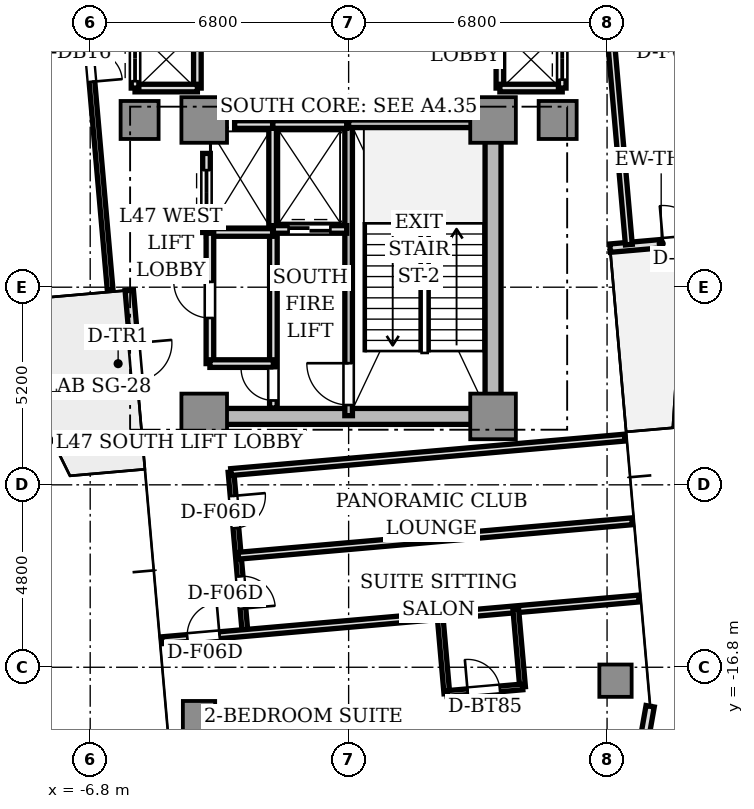
"""IFC4 building model, lengths in metres.
Left out: names, types, materials, properties, quantities, classifications, styles, units other than length and angle.
Written with IfcOpenShell. Run it as: python <this file> out.ifc"""

import sys

from ifc_helpers import new_model, si_unit, direction, frame, frame_2d, origin, origin_2d, place, context, subcontext, project, spatial, rectangle, extrude, source, transform, mapped, element, fill, save


model = new_model("IFC4")
c1 = context("Model", 3, precision=1e-05, world=origin(), true_north=direction((0.0, 1.0)))
c2 = subcontext(c1, "Body", "Model", "MODEL_VIEW")
j1 = project(units=[si_unit("LENGTHUNIT", "METRE"), si_unit("PLANEANGLEUNIT", "RADIAN")], contexts=[c1])
p1 = place(None, origin())
s1 = spatial("IfcSite", under=j1, at=p1, CompositionType="ELEMENT")
p2 = place(p1, origin())
s2 = spatial("IfcBuilding", under=s1, at=p2, CompositionType="ELEMENT")
p3 = place(p2, frame((0.0, 0.0, 170.7)))
s3 = spatial("IfcBuildingStorey", under=s2, at=p3, CompositionType="ELEMENT", Elevation=170.7)
p4 = place(p3, frame((-3.55, -10.2, 0.0), z_axis=(0.0, 0.0, 1.0), x_axis=(1.0, 0.0, 0.0)))
e1 = element("IfcWall", 1, at=p4, inside=s3, PredefinedType="SHEAR", context=c2, shape_type="SweptSolid", body=[
    extrude(rectangle(XDim=7.1, YDim=0.42, at=frame_2d((3.55, 0.0))), origin(), (0.0, 0.0, 1.0), 4.26),
])
p5 = place(p3, frame((3.8, -9.75, 0.0), z_axis=(0.0, 0.0, 1.0), x_axis=(0.0, 1.0, 0.0)))
e2 = element("IfcWall", 2, at=p5, inside=s3, PredefinedType="SHEAR", context=c2, shape_type="SweptSolid", body=[
    extrude(rectangle(XDim=6.9, YDim=0.42, at=frame_2d((3.45, 0.0))), origin(), (0.0, 0.0, 1.0), 4.26),
])
m1 = source(origin(), c2, "Body", "SweptSolid", [
    extrude(rectangle(XDim=1.2, YDim=1.2, at=origin_2d()), origin(), (0.0, 0.0, 1.0), 4.26),
])
for number, where, z_axis, x_axis in (
    (3, (-3.8, -2.4, 0.0), (0.0, 0.0, 1.0), (1.0, 0.0, 0.0)),
    (4, (3.8, -2.4, 0.0), (0.0, 0.0, 1.0), (1.0, 0.0, 0.0)),
    (5, (-3.8, -10.2, 0.0), (0.0, 0.0, 1.0), (1.0, 0.0, 0.0)),
    (6, (3.8, -10.2, 0.0), (0.0, 0.0, 1.0), (1.0, 0.0, 0.0)),
):
    element("IfcColumn", number, at=place(p3, frame(where, z_axis=z_axis, x_axis=x_axis)), inside=s3, PredefinedType="COLUMN", context=c2, shape_type="MappedRepresentation", body=[
        mapped(m1, transform((0.0, 0.0, 0.0), scale=1.0)),
    ])
m2 = source(origin(), c2, "Body", "SweptSolid", [
    extrude(rectangle(XDim=1.0, YDim=1.0, at=origin_2d()), origin(), (0.0, 0.0, 1.0), 4.26),
])
for number, where, z_axis, x_axis in (
    (7, (5.5, -2.4, 0.0), (0.0, 0.0, 1.0), (1.0, 0.0, 0.0)),
    (8, (-5.5, -2.4, 0.0), (0.0, 0.0, 1.0), (1.0, 0.0, 0.0)),
):
    element("IfcColumn", number, at=place(p3, frame(where, z_axis=z_axis, x_axis=x_axis)), inside=s3, PredefinedType="COLUMN", context=c2, shape_type="MappedRepresentation", body=[
        mapped(m2, transform((0.0, 0.0, 0.0), scale=1.0)),
    ])
m3 = source(origin(), c2, "Body", "SweptSolid", [
    extrude(rectangle(XDim=0.85, YDim=0.85, at=origin_2d()), origin(), (0.0, 0.0, 1.0), 4.26),
])
for number, where, z_axis, x_axis in (
    (9, (-3.936, -18.112, 0.0), (0.0, 0.0, 1.0), (1.0, 0.0, 0.0)),
    (10, (7.022, -17.153, 0.0), (0.0, 0.0, 1.0), (1.0, 0.0, 0.0)),
):
    element("IfcColumn", number, at=place(p3, frame(where, z_axis=z_axis, x_axis=x_axis)), inside=s3, PredefinedType="COLUMN", context=c2, shape_type="MappedRepresentation", body=[
        mapped(m3, transform((0.0, 0.0, 0.0), scale=1.0)),
    ])
p6 = place(p3, frame((6.879, -5.772, 0.0), z_axis=(0.0, 0.0, 1.0), x_axis=(0.996193619346, 0.087168071984, 0.0)))
e11 = element("IfcWall", 11, at=p6, inside=s3, PredefinedType="STANDARD", context=c2, shape_type="SweptSolid", body=[
    extrude(rectangle(XDim=2.7, YDim=0.22, at=frame_2d((1.35, 0.0))), origin(), (0.0, 0.0, 1.0), 4.26),
])
p7 = place(p6, frame((1.4, 0.0, 0.0)))
e12 = element("IfcOpeningElement", 12, at=p7, cuts=e11, PredefinedType="OPENING", context=c2, shape_type="SweptSolid", body=[
    extrude(rectangle(XDim=1.0, YDim=2.2, at=frame_2d((0.5, 1.1))), frame((0.0, 0.12, 0.0), z_axis=(0.0, -1.0, 0.0), x_axis=(1.0, 0.0, 0.0)), (0.0, 0.0, 1.0), 0.24),
])
p8 = place(p3, frame((-5.772, -6.879, 0.0), z_axis=(0.0, 0.0, 1.0), x_axis=(0.087168071984, -0.996193619346, 0.0)))
e13 = element("IfcWall", 13, at=p8, inside=s3, PredefinedType="STANDARD", context=c2, shape_type="SweptSolid", body=[
    extrude(rectangle(XDim=2.7, YDim=0.22, at=frame_2d((1.35, 0.0))), origin(), (0.0, 0.0, 1.0), 4.26),
])
p9 = place(p8, frame((1.4, 0.0, 0.0)))
e14 = element("IfcOpeningElement", 14, at=p9, cuts=e13, PredefinedType="OPENING", context=c2, shape_type="SweptSolid", body=[
    extrude(rectangle(XDim=1.0, YDim=2.2, at=frame_2d((0.5, 1.1))), frame((0.0, 0.12, 0.0), z_axis=(0.0, -1.0, 0.0), x_axis=(1.0, 0.0, 0.0)), (0.0, 0.0, 1.0), 0.24),
])
p10 = place(p3, frame((7.768, -18.769, 0.0), z_axis=(0.0, 0.0, 1.0), x_axis=(0.173654409999, 0.984806654064, 0.0)))
e15 = element("IfcWall", 15, at=p10, inside=s3, PredefinedType="STANDARD", context=c2, shape_type="SweptSolid", body=[
    extrude(rectangle(XDim=0.958, YDim=0.22, at=frame_2d((0.479, 0.0))), origin(), (0.0, 0.0, 1.0), 4.26),
])
p11 = place(p3, frame((0.0, -10.18, 0.0), z_axis=(0.0, 0.0, 1.0), x_axis=(0.0, 1.0, 0.0)))
e16 = element("IfcWall", 16, at=p11, inside=s3, PredefinedType="SOLIDWALL", context=c2, shape_type="SweptSolid", body=[
    extrude(rectangle(XDim=7.68, YDim=0.2, at=frame_2d((3.84, 0.0))), origin(), (0.0, 0.0, 1.0), 4.26),
])
p12 = place(p11, frame((0.28, 0.0, 0.0)))
e17 = element("IfcOpeningElement", 17, at=p12, cuts=e16, PredefinedType="OPENING", context=c2, shape_type="SweptSolid", body=[
    extrude(rectangle(XDim=1.1, YDim=2.15, at=frame_2d((0.55, 1.075))), frame((0.0, 0.11, 0.0), z_axis=(0.0, -1.0, 0.0), x_axis=(1.0, 0.0, 0.0)), (0.0, 0.0, 1.0), 0.22),
])
p13 = place(p3, frame((0.0, -2.5, 0.0), z_axis=(0.0, 0.0, 1.0), x_axis=(1.0, 0.0, 0.0)))
e18 = element("IfcWall", 18, at=p13, inside=s3, PredefinedType="SOLIDWALL", context=c2, shape_type="SweptSolid", body=[
    extrude(rectangle(XDim=3.72, YDim=0.2, at=frame_2d((1.86, 0.0))), origin(), (0.0, 0.0, 1.0), 4.26),
])
p14 = place(p3, frame((-1.98, -9.98, 0.0), z_axis=(0.0, 0.0, 1.0), x_axis=(0.0, 1.0, 0.0)))
e19 = element("IfcWall", 19, at=p14, inside=s3, PredefinedType="SOLIDWALL", context=c2, shape_type="SweptSolid", body=[
    extrude(rectangle(XDim=4.66, YDim=0.2, at=frame_2d((2.33, 0.0))), origin(), (0.0, 0.0, 1.0), 3.81),
])
p15 = place(p14, frame((0.2, 0.0, 0.0)))
e20 = element("IfcOpeningElement", 20, at=p15, cuts=e19, PredefinedType="OPENING", context=c2, shape_type="SweptSolid", body=[
    extrude(rectangle(XDim=0.85, YDim=2.1, at=frame_2d((0.425, 1.05))), frame((0.0, 0.11, 0.0), z_axis=(0.0, -1.0, 0.0), x_axis=(1.0, 0.0, 0.0)), (0.0, 0.0, 1.0), 0.22),
])
p16 = place(p3, frame((-2.0, -5.28, 0.0), z_axis=(0.0, 0.0, 1.0), x_axis=(0.0, 1.0, 0.0)))
e21 = element("IfcWall", 21, at=p16, inside=s3, PredefinedType="SOLIDWALL", context=c2, shape_type="SweptSolid", body=[
    extrude(rectangle(XDim=2.78, YDim=0.2, at=frame_2d((1.39, 0.0))), origin(), (0.0, 0.0, 1.0), 3.81),
])
p17 = place(p3, frame((-2.0, -2.52, 0.0), z_axis=(0.0, 0.0, 1.0), x_axis=(1.0, 0.0, 0.0)))
e22 = element("IfcWall", 22, at=p17, inside=s3, PredefinedType="SOLIDWALL", context=c2, shape_type="SweptSolid", body=[
    extrude(rectangle(XDim=1.95, YDim=0.2, at=frame_2d((0.975, 0.0))), origin(), (0.0, 0.0, 1.0), 3.81),
])
p18 = place(p3, frame((-1.98, -5.28, 0.0), z_axis=(0.0, 0.0, 1.0), x_axis=(1.0, 0.0, 0.0)))
e23 = element("IfcWall", 23, at=p18, inside=s3, PredefinedType="SOLIDWALL", context=c2, shape_type="SweptSolid", body=[
    extrude(rectangle(XDim=1.93, YDim=0.2, at=frame_2d((0.965, 0.0))), origin(), (0.0, 0.0, 1.0), 3.81),
])
p19 = place(p18, frame((0.4, 0.0, 0.0)))
e24 = element("IfcOpeningElement", 24, at=p19, cuts=e23, PredefinedType="OPENING", context=c2, shape_type="SweptSolid", body=[
    extrude(rectangle(XDim=1.1, YDim=2.2, at=frame_2d((0.55, 1.1))), frame((0.0, 0.11, 0.0), z_axis=(0.0, -1.0, 0.0), x_axis=(1.0, 0.0, 0.0)), (0.0, 0.0, 1.0), 0.22),
])
p20 = place(p3, frame((-3.0, -2.52, 0.0), z_axis=(0.0, 0.0, 1.0), x_axis=(1.0, 0.0, 0.0)))
e25 = element("IfcWall", 25, at=p20, inside=s3, PredefinedType="SOLIDWALL", context=c2, shape_type="SweptSolid", body=[
    extrude(rectangle(XDim=1.0, YDim=0.2, at=frame_2d((0.5, 0.0))), origin(), (0.0, 0.0, 1.0), 3.81),
])
p21 = place(p3, frame((-3.74, -5.36, 0.0), z_axis=(0.0, 0.0, 1.0), x_axis=(1.0, 0.0, 0.0)))
e26 = element("IfcWall", 26, at=p21, inside=s3, PredefinedType="SOLIDWALL", context=c2, shape_type="SweptSolid", body=[
    extrude(rectangle(XDim=1.74, YDim=0.2, at=frame_2d((0.87, 0.0))), origin(), (0.0, 0.0, 1.0), 3.81),
])
p22 = place(p3, frame((-3.74, -5.36, 0.0), z_axis=(0.0, 0.0, 1.0), x_axis=(0.0, 1.0, 0.0)))
e27 = element("IfcWall", 27, at=p22, inside=s3, PredefinedType="SOLIDWALL", context=c2, shape_type="SweptSolid", body=[
    extrude(rectangle(XDim=2.08, YDim=0.2, at=frame_2d((1.04, 0.0))), origin(), (0.0, 0.0, 1.0), 3.81),
])
p23 = place(p22, frame((0.44, 0.0, 0.0)))
e28 = element("IfcOpeningElement", 28, at=p23, cuts=e27, PredefinedType="OPENING", context=c2, shape_type="SweptSolid", body=[
    extrude(rectangle(XDim=1.2, YDim=2.2, at=frame_2d((0.6, 1.1))), frame((0.0, 0.11, 0.0), z_axis=(0.0, -1.0, 0.0), x_axis=(1.0, 0.0, 0.0)), (0.0, 0.0, 1.0), 0.22),
])
p24 = place(p3, frame((3.98, -1.56, 0.0), z_axis=(0.0, 0.0, 1.0), x_axis=(0.0, 1.0, 0.0)))
e29 = element("IfcWall", 29, at=p24, inside=s3, PredefinedType="SOLIDWALL", context=c2, shape_type="SweptSolid", body=[
    extrude(rectangle(XDim=3.12, YDim=0.2, at=frame_2d((1.56, 0.0))), origin(), (0.0, 0.0, 1.0), 3.43),
])
p25 = place(p3, frame((3.98, -1.56, 0.0), z_axis=(0.0, 0.0, 1.0), x_axis=(1.0, 0.0, 0.0)))
e30 = element("IfcWall", 30, at=p25, inside=s3, PredefinedType="SOLIDWALL", context=c2, shape_type="SweptSolid", body=[
    extrude(rectangle(XDim=1.64, YDim=0.2, at=frame_2d((0.82, 0.0))), origin(), (0.0, 0.0, 1.0), 3.81),
])
p26 = place(p3, frame((5.62, -1.56, 0.0), z_axis=(0.0, 0.0, 1.0), x_axis=(0.0, 1.0, 0.0)))
e31 = element("IfcWall", 31, at=p26, inside=s3, PredefinedType="SOLIDWALL", context=c2, shape_type="SweptSolid", body=[
    extrude(rectangle(XDim=1.56, YDim=0.2, at=frame_2d((0.78, 0.0))), origin(), (0.0, 0.0, 1.0), 3.81),
])
p27 = place(p26, frame((0.22, 0.0, 0.0)))
e32 = element("IfcOpeningElement", 32, at=p27, cuts=e31, PredefinedType="OPENING", context=c2, shape_type="SweptSolid", body=[
    extrude(rectangle(XDim=1.1, YDim=2.2, at=frame_2d((0.55, 1.1))), frame((0.0, 0.11, 0.0), z_axis=(0.0, -1.0, 0.0), x_axis=(1.0, 0.0, 0.0)), (0.0, 0.0, 1.0), 0.22),
])
p28 = place(p3, frame((-3.98, -1.56, 0.0), z_axis=(0.0, 0.0, 1.0), x_axis=(0.0, 1.0, 0.0)))
e33 = element("IfcWall", 33, at=p28, inside=s3, PredefinedType="SOLIDWALL", context=c2, shape_type="SweptSolid", body=[
    extrude(rectangle(XDim=3.12, YDim=0.2, at=frame_2d((1.56, 0.0))), origin(), (0.0, 0.0, 1.0), 3.43),
])
p29 = place(p3, frame((-5.62, -1.56, 0.0), z_axis=(0.0, 0.0, 1.0), x_axis=(1.0, 0.0, 0.0)))
e34 = element("IfcWall", 34, at=p29, inside=s3, PredefinedType="SOLIDWALL", context=c2, shape_type="SweptSolid", body=[
    extrude(rectangle(XDim=1.64, YDim=0.2, at=frame_2d((0.82, 0.0))), origin(), (0.0, 0.0, 1.0), 3.81),
])
p30 = place(p3, frame((-5.62, -1.56, 0.0), z_axis=(0.0, 0.0, 1.0), x_axis=(0.0, 1.0, 0.0)))
e35 = element("IfcWall", 35, at=p30, inside=s3, PredefinedType="SOLIDWALL", context=c2, shape_type="SweptSolid", body=[
    extrude(rectangle(XDim=1.56, YDim=0.2, at=frame_2d((0.78, 0.0))), origin(), (0.0, 0.0, 1.0), 3.81),
])
p31 = place(p30, frame((0.18, 0.0, 0.0)))
e36 = element("IfcOpeningElement", 36, at=p31, cuts=e35, PredefinedType="OPENING", context=c2, shape_type="SweptSolid", body=[
    extrude(rectangle(XDim=1.2, YDim=2.2, at=frame_2d((0.6, 1.1))), frame((0.0, 0.11, 0.0), z_axis=(0.0, -1.0, 0.0), x_axis=(1.0, 0.0, 0.0)), (0.0, 0.0, 1.0), 0.22),
])
p32 = place(p3, frame((-3.65, -8.81, 0.0), z_axis=(0.0, 0.0, 1.0), x_axis=(0.0, 1.0, 0.0)))
e37 = element("IfcWall", 37, at=p32, inside=s3, PredefinedType="SOLIDWALL", context=c2, shape_type="SweptSolid", body=[
    extrude(rectangle(XDim=3.43, YDim=0.2, at=frame_2d((1.715, 0.0))), origin(), (0.0, 0.0, 1.0), 3.81),
])
p33 = place(p32, frame((1.2, 0.0, 0.0)))
e38 = element("IfcOpeningElement", 38, at=p33, cuts=e37, PredefinedType="OPENING", context=c2, shape_type="SweptSolid", body=[
    extrude(rectangle(XDim=0.95, YDim=2.15, at=frame_2d((0.475, 1.075))), frame((0.0, 0.11, 0.0), z_axis=(0.0, -1.0, 0.0), x_axis=(1.0, 0.0, 0.0)), (0.0, 0.0, 1.0), 0.22),
])
p34 = place(p3, frame((-3.65, -8.81, 0.0), z_axis=(0.0, 0.0, 1.0), x_axis=(1.0, 0.0, 0.0)))
e39 = element("IfcWall", 39, at=p34, inside=s3, PredefinedType="SOLIDWALL", context=c2, shape_type="SweptSolid", body=[
    extrude(rectangle(XDim=1.67, YDim=0.2, at=frame_2d((0.835, 0.0))), origin(), (0.0, 0.0, 1.0), 3.81),
])
p35 = place(p3, frame((7.373, -5.679, 0.0), z_axis=(0.0, 0.0, 1.0), x_axis=(-0.087161289348, 0.996194212812, 0.0)))
e40 = element("IfcWall", 40, at=p35, inside=s3, PredefinedType="PARTITIONING", context=c2, shape_type="SweptSolid", body=[
    extrude(rectangle(XDim=5.35, YDim=0.18, at=frame_2d((2.675, 0.0))), origin(), (0.0, 0.0, 1.0), 3.81),
])
p36 = place(p3, frame((-7.373, 5.679, 0.0), z_axis=(0.0, 0.0, 1.0), x_axis=(0.087154691724, -0.996194790044, 0.0)))
e41 = element("IfcWall", 41, at=p36, inside=s3, PredefinedType="PARTITIONING", context=c2, shape_type="SweptSolid", body=[
    extrude(rectangle(XDim=12.6, YDim=0.15, at=frame_2d((6.3, 0.0))), origin(), (0.0, 0.0, 1.0), 3.81),
])
p37 = place(p36, frame((5.5, 0.0, 0.0)))
e42 = element("IfcOpeningElement", 42, at=p37, cuts=e41, PredefinedType="OPENING", context=c2, shape_type="SweptSolid", body=[
    extrude(rectangle(XDim=1.6, YDim=2.25, at=frame_2d((0.8, 1.125))), frame((0.0, 0.085, 0.0), z_axis=(0.0, -1.0, 0.0), x_axis=(1.0, 0.0, 0.0)), (0.0, 0.0, 1.0), 0.17),
])
p38 = place(p3, frame((-3.095, -11.664, 0.0), z_axis=(0.0, 0.0, 1.0), x_axis=(0.087142722004, -0.996195837173, 0.0)))
e43 = element("IfcWall", 43, at=p38, inside=s3, PredefinedType="PARTITIONING", context=c2, shape_type="SweptSolid", body=[
    extrude(rectangle(XDim=4.25, YDim=0.15, at=frame_2d((2.125, 0.0))), origin(), (0.0, 0.0, 1.0), 3.81),
])
p39 = place(p38, frame((0.63, 0.0, 0.0)))
e44 = element("IfcOpeningElement", 44, at=p39, cuts=e43, PredefinedType="OPENING", context=c2, shape_type="SweptSolid", body=[
    extrude(rectangle(XDim=0.85, YDim=2.1, at=frame_2d((0.425, 1.05))), frame((0.0, 0.085, 0.0), z_axis=(0.0, -1.0, 0.0), x_axis=(1.0, 0.0, 0.0)), (0.0, 0.0, 1.0), 0.17),
])
p40 = place(p38, frame((2.755, 0.0, 0.0)))
e45 = element("IfcOpeningElement", 45, at=p40, cuts=e43, PredefinedType="OPENING", context=c2, shape_type="SweptSolid", body=[
    extrude(rectangle(XDim=0.85, YDim=2.1, at=frame_2d((0.425, 1.05))), frame((0.0, 0.085, 0.0), z_axis=(0.0, -1.0, 0.0), x_axis=(1.0, 0.0, 0.0)), (0.0, 0.0, 1.0), 0.17),
])
p41 = place(p3, frame((-3.095, -11.664, 0.0), z_axis=(0.0, 0.0, 1.0), x_axis=(0.996196061386, 0.087140158824, 0.0)))
e46 = element("IfcWall", 46, at=p41, inside=s3, PredefinedType="PARTITIONING", context=c2, shape_type="SweptSolid", body=[
    extrude(rectangle(XDim=10.4, YDim=0.18, at=frame_2d((5.2, 0.0))), origin(), (0.0, 0.0, 1.0), 3.81),
])
p42 = place(p3, frame((-2.903, -13.866, 0.0), z_axis=(0.0, 0.0, 1.0), x_axis=(0.996194201607, 0.087161417409, 0.0)))
e47 = element("IfcWall", 47, at=p42, inside=s3, PredefinedType="PARTITIONING", context=c2, shape_type="SweptSolid", body=[
    extrude(rectangle(XDim=10.4, YDim=0.18, at=frame_2d((5.2, 0.0))), origin(), (0.0, 0.0, 1.0), 3.81),
])
p43 = place(p3, frame((-4.917, -16.09, 0.0), z_axis=(0.0, 0.0, 1.0), x_axis=(0.996196619285, 0.087133780622, 0.0)))
e48 = element("IfcWall", 48, at=p43, inside=s3, PredefinedType="PARTITIONING", context=c2, shape_type="SweptSolid", body=[
    extrude(rectangle(XDim=12.6, YDim=0.18, at=frame_2d((6.3, 0.0))), origin(), (0.0, 0.0, 1.0), 3.81),
])
p44 = place(p43, frame((0.675, 0.0, 0.0)))
e49 = element("IfcOpeningElement", 49, at=p44, cuts=e48, PredefinedType="OPENING", context=c2, shape_type="SweptSolid", body=[
    extrude(rectangle(XDim=0.85, YDim=2.1, at=frame_2d((0.425, 1.05))), frame((0.0, 0.1, 0.0), z_axis=(0.0, -1.0, 0.0), x_axis=(1.0, 0.0, 0.0)), (0.0, 0.0, 1.0), 0.2),
])
for number, where, z_axis, x_axis in (
    (50, (4.398, -15.275, 0.0), (0.0, 0.0, 1.0), (0.087, -0.996, 0.0)),
    (51, (2.406, -15.449, 0.0), (0.0, 0.0, 1.0), (0.087, -0.996, 0.0)),
):
    element("IfcWall", number, at=place(p3, frame(where, z_axis=z_axis, x_axis=x_axis)), inside=s3, PredefinedType="PARTITIONING", context=c2, shape_type="SweptSolid", body=[
        extrude(rectangle(XDim=2.05, YDim=0.15, at=frame_2d((1.025, 0.0))), origin(), (0.0, 0.0, 1.0), 3.81),
    ])
p45 = place(p3, frame((2.584, -17.491, 0.0), z_axis=(0.0, 0.0, 1.0), x_axis=(0.99619464492, 0.087156350505, 0.0)))
e52 = element("IfcWall", 52, at=p45, inside=s3, PredefinedType="PARTITIONING", context=c2, shape_type="SweptSolid", body=[
    extrude(rectangle(XDim=2.0, YDim=0.15, at=frame_2d((1.0, 0.0))), origin(), (0.0, 0.0, 1.0), 3.78),
])
p46 = place(p45, frame((0.55, 0.0, 0.0)))
e53 = element("IfcOpeningElement", 53, at=p46, cuts=e52, PredefinedType="OPENING", context=c2, shape_type="SweptSolid", body=[
    extrude(rectangle(XDim=0.85, YDim=2.1, at=frame_2d((0.425, 1.05))), frame((0.0, 0.085, 0.0), z_axis=(0.0, -1.0, 0.0), x_axis=(1.0, 0.0, 0.0)), (0.0, 0.0, 1.0), 0.17),
])
m4 = source(origin(), c2, "Body", "SweptSolid", [
    extrude(rectangle(XDim=1.0, YDim=0.05, at=origin_2d()), origin(), (0.0, 0.0, 1.0), 2.2),
])
p47 = place(p7, frame((0.5, 0.0, 0.0)))
e54 = element("IfcDoor", 54, at=p47, inside=s3, OperationType="SINGLE_SWING_LEFT", PredefinedType="DOOR", context=c2, shape_type="MappedRepresentation", body=[
    mapped(m4, transform((0.0, 0.0, 0.0), scale=1.0)),
])
fill(e12, e54)
p48 = place(p9, frame((0.5, 0.0, 0.0)))
e55 = element("IfcDoor", 55, at=p48, inside=s3, OperationType="SINGLE_SWING_LEFT", PredefinedType="DOOR", context=c2, shape_type="MappedRepresentation", body=[
    mapped(m4, transform((0.0, 0.0, 0.0), scale=1.0)),
])
fill(e14, e55)
m5 = source(origin(), c2, "Body", "SweptSolid", [
    extrude(rectangle(XDim=1.1, YDim=0.05, at=origin_2d()), origin(), (0.0, 0.0, 1.0), 2.15),
])
p49 = place(p12, frame((0.55, 0.0, 0.0)))
e56 = element("IfcDoor", 56, at=p49, inside=s3, OperationType="SINGLE_SWING_RIGHT", PredefinedType="DOOR", context=c2, shape_type="MappedRepresentation", body=[
    mapped(m5, transform((0.0, 0.0, 0.0), scale=1.0)),
])
fill(e17, e56)
m6 = source(origin(), c2, "Body", "SweptSolid", [
    extrude(rectangle(XDim=0.85, YDim=0.05, at=origin_2d()), origin(), (0.0, 0.0, 1.0), 2.1),
])
p50 = place(p15, frame((0.425, 0.0, 0.0)))
e57 = element("IfcDoor", 57, at=p50, inside=s3, OperationType="SINGLE_SWING_RIGHT", PredefinedType="DOOR", context=c2, shape_type="MappedRepresentation", body=[
    mapped(m6, transform((0.0, 0.0, 0.0), scale=1.0)),
])
fill(e20, e57)
m7 = source(origin(), c2, "Body", "SweptSolid", [
    extrude(rectangle(XDim=1.1, YDim=0.05, at=origin_2d()), origin(), (0.0, 0.0, 1.0), 2.2),
])
p51 = place(p19, frame((0.55, 0.0, 0.0)))
e58 = element("IfcDoor", 58, at=p51, inside=s3, OperationType="DOUBLE_DOOR_SLIDING", PredefinedType="DOOR", context=c2, shape_type="MappedRepresentation", body=[
    mapped(m7, transform((0.0, 0.0, 0.0), scale=1.0)),
])
fill(e24, e58)
m8 = source(origin(), c2, "Body", "SweptSolid", [
    extrude(rectangle(XDim=1.2, YDim=0.05, at=origin_2d()), origin(), (0.0, 0.0, 1.0), 2.2),
])
p52 = place(p23, frame((0.6, 0.0, 0.0)))
e59 = element("IfcDoor", 59, at=p52, inside=s3, OperationType="DOUBLE_DOOR_SLIDING", PredefinedType="DOOR", context=c2, shape_type="MappedRepresentation", body=[
    mapped(m8, transform((0.0, 0.0, 0.0), scale=1.0)),
])
fill(e28, e59)
p53 = place(p27, frame((0.55, 0.0, 0.0)))
e60 = element("IfcDoor", 60, at=p53, inside=s3, OperationType="DOUBLE_DOOR_SLIDING", PredefinedType="DOOR", context=c2, shape_type="MappedRepresentation", body=[
    mapped(m7, transform((0.0, 0.0, 0.0), scale=1.0)),
])
fill(e32, e60)
p54 = place(p31, frame((0.6, 0.0, 0.0)))
e61 = element("IfcDoor", 61, at=p54, inside=s3, OperationType="DOUBLE_DOOR_SLIDING", PredefinedType="DOOR", context=c2, shape_type="MappedRepresentation", body=[
    mapped(m8, transform((0.0, 0.0, 0.0), scale=1.0)),
])
fill(e36, e61)
m9 = source(origin(), c2, "Body", "SweptSolid", [
    extrude(rectangle(XDim=0.95, YDim=0.05, at=origin_2d()), origin(), (0.0, 0.0, 1.0), 2.15),
])
p55 = place(p33, frame((0.475, 0.0, 0.0)))
e62 = element("IfcDoor", 62, at=p55, inside=s3, OperationType="SINGLE_SWING_RIGHT", PredefinedType="DOOR", context=c2, shape_type="MappedRepresentation", body=[
    mapped(m9, transform((0.0, 0.0, 0.0), scale=1.0)),
])
fill(e38, e62)
m10 = source(origin(), c2, "Body", "SweptSolid", [
    extrude(rectangle(XDim=1.6, YDim=0.05, at=origin_2d()), origin(), (0.0, 0.0, 1.0), 2.25),
])
p56 = place(p37, frame((0.8, 0.0, 0.0)))
e63 = element("IfcDoor", 63, at=p56, inside=s3, OperationType="DOUBLE_DOOR_SINGLE_SWING", PredefinedType="DOOR", context=c2, shape_type="MappedRepresentation", body=[
    mapped(m10, transform((0.0, 0.0, 0.0), scale=1.0)),
])
fill(e42, e63)
p57 = place(p39, frame((0.425, 0.0, 0.0)))
e64 = element("IfcDoor", 64, at=p57, inside=s3, OperationType="SINGLE_SWING_LEFT", PredefinedType="DOOR", context=c2, shape_type="MappedRepresentation", body=[
    mapped(m6, transform((0.0, 0.0, 0.0), scale=1.0)),
])
fill(e44, e64)
p58 = place(p40, frame((0.425, 0.0, 0.0)))
e65 = element("IfcDoor", 65, at=p58, inside=s3, OperationType="SINGLE_SWING_RIGHT", PredefinedType="DOOR", context=c2, shape_type="MappedRepresentation", body=[
    mapped(m6, transform((0.0, 0.0, 0.0), scale=1.0)),
])
fill(e45, e65)
p59 = place(p46, frame((0.425, 0.0, 0.0)))
e66 = element("IfcDoor", 66, at=p59, inside=s3, OperationType="SINGLE_SWING_LEFT", PredefinedType="DOOR", context=c2, shape_type="MappedRepresentation", body=[
    mapped(m6, transform((0.0, 0.0, 0.0), scale=1.0)),
])
fill(e53, e66)
p60 = place(p44, frame((0.425, 0.0, 0.0)))
e67 = element("IfcDoor", 67, at=p60, inside=s3, OperationType="SINGLE_SWING_RIGHT", PredefinedType="DOOR", context=c2, shape_type="MappedRepresentation", body=[
    mapped(m6, transform((0.0, 0.0, 0.0), scale=1.0)),
])
fill(e49, e67)
save(model, sys.argv[1])
